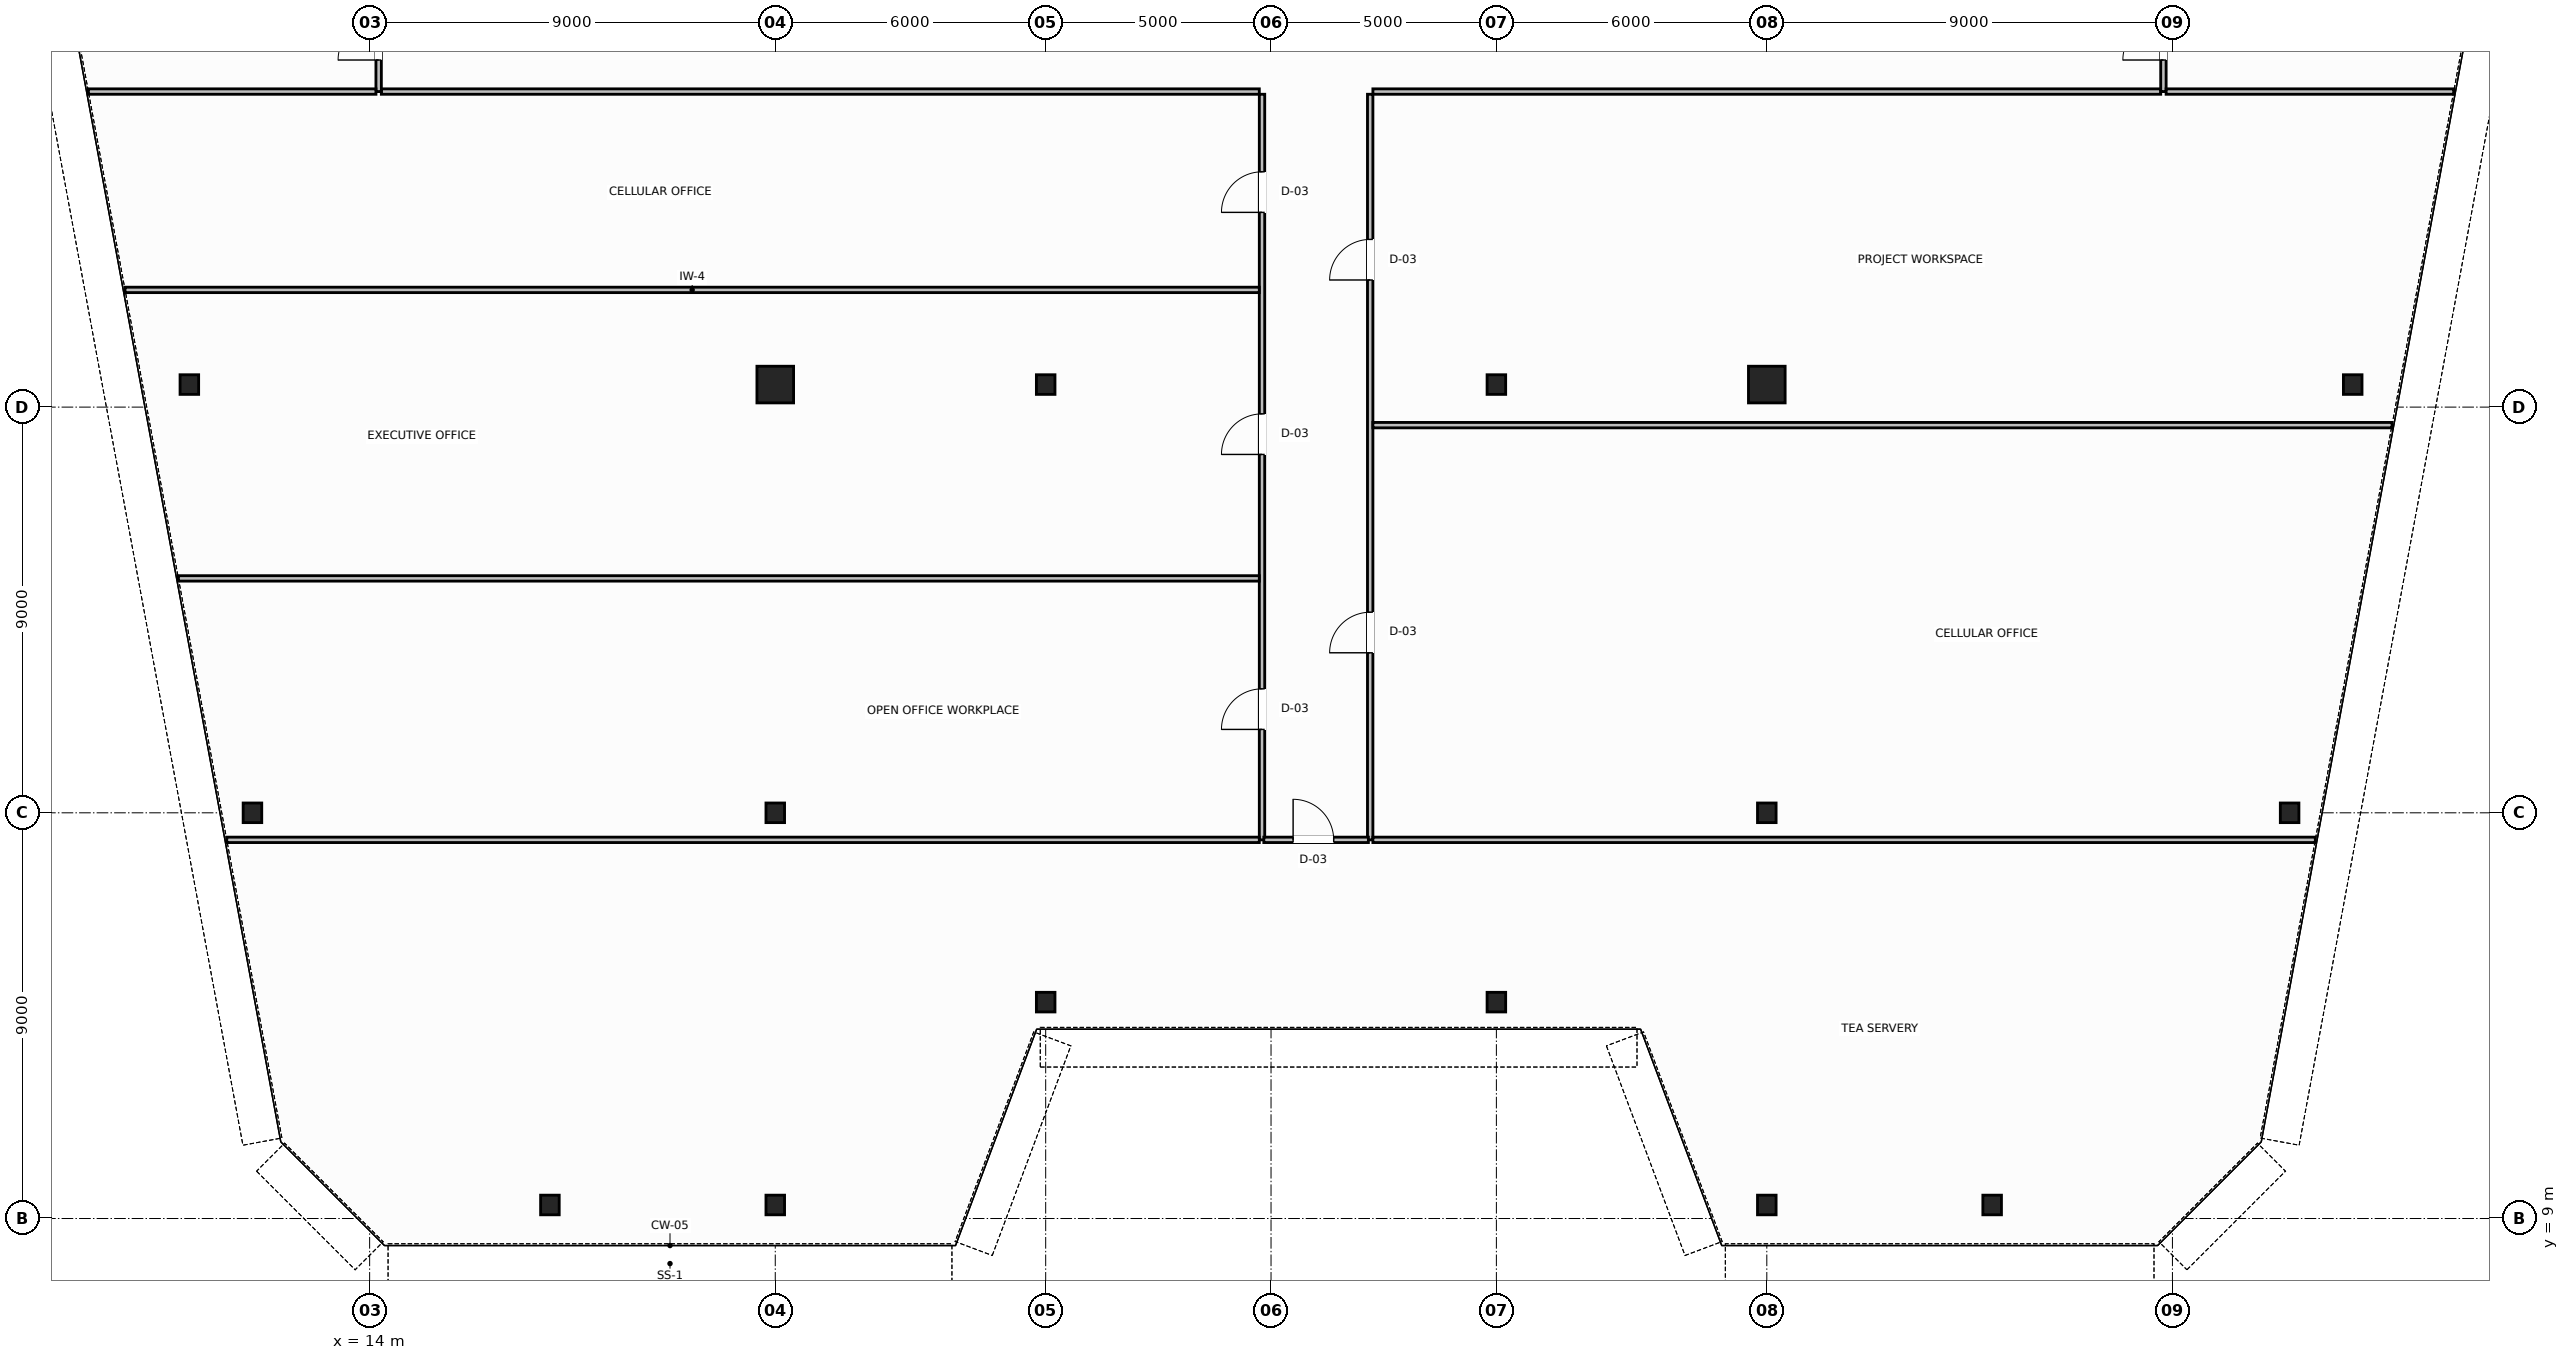
"""IFC4 building model, lengths in metres.
Left out: names, types, materials, properties, quantities, classifications, styles, units other than length and angle.
Written with IfcOpenShell. Run it as: python <this file> out.ifc"""

import sys

from ifc_helpers import new_model, si_unit, direction, frame, frame_2d, origin, origin_2d, place, context, subcontext, project, spatial, rectangle, hollow_circle, i_section, extrude, source, transform, mapped, element, fill, save


model = new_model("IFC4")
c1 = context("Model", 3, precision=1e-05, world=origin(), true_north=direction((0.0, 1.0)))
c2 = subcontext(c1, "Body", "Model", "MODEL_VIEW")
j1 = project(units=[si_unit("LENGTHUNIT", "METRE"), si_unit("PLANEANGLEUNIT", "RADIAN")], contexts=[c1])
p1 = place(None, origin())
s1 = spatial("IfcSite", under=j1, at=p1, CompositionType="ELEMENT")
p2 = place(p1, origin())
s2 = spatial("IfcBuilding", under=s1, at=p2, CompositionType="ELEMENT")
p3 = place(p2, frame((0.0, 0.0, 223.2)))
s3 = spatial("IfcBuildingStorey", under=s2, at=p3, CompositionType="ELEMENT", Elevation=223.2)
m1 = source(origin(), c2, "Body", "SweptSolid", [
    extrude(i_section(OverallWidth=0.412, OverallDepth=0.435, WebThickness=0.036, FlangeThickness=0.05, FilletRadius=0.015, at=origin_2d()), origin(), (0.0, 0.0, 1.0), 3.8),
])
for number, where, z_axis, x_axis in (
    (1, (10.0, 27.5, 0.0), (0.0, 0.0, 1.0), (1.0, 0.0, 0.0)),
    (2, (11.4, 18.0, 0.0), (0.0, 0.0, 1.0), (1.0, 0.0, 0.0)),
    (3, (58.0, 27.5, 0.0), (0.0, 0.0, 1.0), (1.0, 0.0, 0.0)),
    (4, (56.6, 18.0, 0.0), (0.0, 0.0, 1.0), (1.0, 0.0, 0.0)),
):
    element("IfcColumn", number, at=place(p3, frame(where, z_axis=z_axis, x_axis=x_axis)), inside=s3, PredefinedType="COLUMN", context=c2, shape_type="MappedRepresentation", body=[
        mapped(m1, transform((0.0, 0.0, 0.0), scale=1.0)),
    ])
m2 = source(origin(), c2, "Body", "SweptSolid", [
    extrude(hollow_circle(Radius=0.406, WallThickness=0.04, at=origin_2d()), origin(), (0.0, 0.0, 1.0), 3.8),
])
p4 = place(p3, frame((23.0, 27.5, 0.0), z_axis=(0.0, 0.0, 1.0), x_axis=(1.0, 0.0, 0.0)))
e5 = element("IfcColumn", 5, at=p4, inside=s3, PredefinedType="COLUMN", context=c2, shape_type="MappedRepresentation", body=[
    mapped(m2, transform((0.0, 0.0, 0.0), scale=1.0)),
])
m3 = source(origin(), c2, "Body", "SweptSolid", [
    extrude(i_section(OverallWidth=0.412, OverallDepth=0.435, WebThickness=0.036, FlangeThickness=0.05, FilletRadius=0.015, at=origin_2d()), origin(), (0.0, 0.0, 1.0), 3.8),
])
for number, where, z_axis, x_axis in (
    (6, (29.0, 27.5, 0.0), (0.0, 0.0, 1.0), (1.0, 0.0, 0.0)),
    (7, (39.0, 27.5, 0.0), (0.0, 0.0, 1.0), (1.0, 0.0, 0.0)),
):
    element("IfcColumn", number, at=place(p3, frame(where, z_axis=z_axis, x_axis=x_axis)), inside=s3, PredefinedType="COLUMN", context=c2, shape_type="MappedRepresentation", body=[
        mapped(m3, transform((0.0, 0.0, 0.0), scale=1.0)),
    ])
p5 = place(p3, frame((45.0, 27.5, 0.0), z_axis=(0.0, 0.0, 1.0), x_axis=(1.0, 0.0, 0.0)))
e8 = element("IfcColumn", 8, at=p5, inside=s3, PredefinedType="COLUMN", context=c2, shape_type="MappedRepresentation", body=[
    mapped(m2, transform((0.0, 0.0, 0.0), scale=1.0)),
])
for number, where, z_axis, x_axis in (
    (9, (23.0, 18.0, 0.0), (0.0, 0.0, 1.0), (1.0, 0.0, 0.0)),
    (10, (45.0, 18.0, 0.0), (0.0, 0.0, 1.0), (1.0, 0.0, 0.0)),
    (11, (18.0, 9.3, 0.0), (0.0, 0.0, 1.0), (1.0, 0.0, 0.0)),
    (12, (23.0, 9.3, 0.0), (0.0, 0.0, 1.0), (1.0, 0.0, 0.0)),
    (13, (29.0, 13.8, 0.0), (0.0, 0.0, 1.0), (1.0, 0.0, 0.0)),
    (14, (39.0, 13.8, 0.0), (0.0, 0.0, 1.0), (1.0, 0.0, 0.0)),
    (15, (45.0, 9.3, 0.0), (0.0, 0.0, 1.0), (1.0, 0.0, 0.0)),
    (16, (50.0, 9.3, 0.0), (0.0, 0.0, 1.0), (1.0, 0.0, 0.0)),
):
    element("IfcColumn", number, at=place(p3, frame(where, z_axis=z_axis, x_axis=x_axis)), inside=s3, PredefinedType="COLUMN", context=c2, shape_type="MappedRepresentation", body=[
        mapped(m3, transform((0.0, 0.0, 0.0), scale=1.0)),
    ])
p6 = place(p3, frame((14.26, 34.0, 0.0), z_axis=(0.0, 0.0, 1.0), x_axis=(1.0, 0.0, 0.0)))
e17 = element("IfcWall", 17, at=p6, inside=s3, PredefinedType="PARTITIONING", context=c2, shape_type="SweptSolid", body=[
    extrude(rectangle(XDim=19.48, YDim=0.12, at=frame_2d((9.74, 0.0))), origin(), (0.0, 0.0, 1.0), 3.58),
])
p7 = place(p3, frame((36.26, 34.0, 0.0), z_axis=(0.0, 0.0, 1.0), x_axis=(1.0, 0.0, 0.0)))
e18 = element("IfcWall", 18, at=p7, inside=s3, PredefinedType="PARTITIONING", context=c2, shape_type="SweptSolid", body=[
    extrude(rectangle(XDim=17.48, YDim=0.12, at=frame_2d((8.74, 0.0))), origin(), (0.0, 0.0, 1.0), 3.58),
])
p8 = place(p3, frame((14.2, 34.0, 0.0), z_axis=(0.0, 0.0, 1.0), x_axis=(0.0, 1.0, 0.0)))
e19 = element("IfcWall", 19, at=p8, inside=s3, PredefinedType="PARTITIONING", context=c2, shape_type="SweptSolid", body=[
    extrude(rectangle(XDim=2.44, YDim=0.12, at=frame_2d((1.22, 0.0))), origin(), (0.0, 0.0, 1.0), 3.58),
])
p9 = place(p8, frame((0.7, 0.0, 0.0)))
e20 = element("IfcOpeningElement", 20, at=p9, cuts=e19, PredefinedType="OPENING", context=c2, shape_type="SweptSolid", body=[
    extrude(rectangle(XDim=0.9, YDim=2.15, at=frame_2d((0.45, 1.075))), frame((0.0, 0.07, 0.0), z_axis=(0.0, -1.0, 0.0), x_axis=(1.0, 0.0, 0.0)), (0.0, 0.0, 1.0), 0.14),
])
p10 = place(p3, frame((53.8, 34.0, 0.0), z_axis=(0.0, 0.0, 1.0), x_axis=(0.0, 1.0, 0.0)))
e21 = element("IfcWall", 21, at=p10, inside=s3, PredefinedType="PARTITIONING", context=c2, shape_type="SweptSolid", body=[
    extrude(rectangle(XDim=2.44, YDim=0.12, at=frame_2d((1.22, 0.0))), origin(), (0.0, 0.0, 1.0), 3.58),
])
p11 = place(p10, frame((0.7, 0.0, 0.0)))
e22 = element("IfcOpeningElement", 22, at=p11, cuts=e21, PredefinedType="OPENING", context=c2, shape_type="SweptSolid", body=[
    extrude(rectangle(XDim=0.9, YDim=2.15, at=frame_2d((0.45, 1.075))), frame((0.0, 0.07, 0.0), z_axis=(0.0, -1.0, 0.0), x_axis=(1.0, 0.0, 0.0)), (0.0, 0.0, 1.0), 0.14),
])
p12 = place(p3, frame((33.8, 17.4, 0.0), z_axis=(0.0, 0.0, 1.0), x_axis=(0.0, 1.0, 0.0)))
e23 = element("IfcWall", 23, at=p12, inside=s3, PredefinedType="PARTITIONING", context=c2, shape_type="SweptSolid", body=[
    extrude(rectangle(XDim=16.54, YDim=0.12, at=frame_2d((8.27, 0.0))), origin(), (0.0, 0.0, 1.0), 3.58),
])
p13 = place(p12, frame((2.45, 0.0, 0.0)))
e24 = element("IfcOpeningElement", 24, at=p13, cuts=e23, PredefinedType="OPENING", context=c2, shape_type="SweptSolid", body=[
    extrude(rectangle(XDim=0.9, YDim=2.15, at=frame_2d((0.45, 1.075))), frame((0.0, 0.07, 0.0), z_axis=(0.0, -1.0, 0.0), x_axis=(1.0, 0.0, 0.0)), (0.0, 0.0, 1.0), 0.14),
])
p14 = place(p12, frame((8.55, 0.0, 0.0)))
e25 = element("IfcOpeningElement", 25, at=p14, cuts=e23, PredefinedType="OPENING", context=c2, shape_type="SweptSolid", body=[
    extrude(rectangle(XDim=0.9, YDim=2.15, at=frame_2d((0.45, 1.075))), frame((0.0, 0.07, 0.0), z_axis=(0.0, -1.0, 0.0), x_axis=(1.0, 0.0, 0.0)), (0.0, 0.0, 1.0), 0.14),
])
p15 = place(p12, frame((13.92, 0.0, 0.0)))
e26 = element("IfcOpeningElement", 26, at=p15, cuts=e23, PredefinedType="OPENING", context=c2, shape_type="SweptSolid", body=[
    extrude(rectangle(XDim=0.9, YDim=2.15, at=frame_2d((0.45, 1.075))), frame((0.0, 0.07, 0.0), z_axis=(0.0, -1.0, 0.0), x_axis=(1.0, 0.0, 0.0)), (0.0, 0.0, 1.0), 0.14),
])
p16 = place(p3, frame((36.2, 17.4, 0.0), z_axis=(0.0, 0.0, 1.0), x_axis=(0.0, 1.0, 0.0)))
e27 = element("IfcWall", 27, at=p16, inside=s3, PredefinedType="PARTITIONING", context=c2, shape_type="SweptSolid", body=[
    extrude(rectangle(XDim=16.54, YDim=0.12, at=frame_2d((8.27, 0.0))), origin(), (0.0, 0.0, 1.0), 3.58),
])
p17 = place(p16, frame((4.15, 0.0, 0.0)))
e28 = element("IfcOpeningElement", 28, at=p17, cuts=e27, PredefinedType="OPENING", context=c2, shape_type="SweptSolid", body=[
    extrude(rectangle(XDim=0.9, YDim=2.15, at=frame_2d((0.45, 1.075))), frame((0.0, 0.07, 0.0), z_axis=(0.0, -1.0, 0.0), x_axis=(1.0, 0.0, 0.0)), (0.0, 0.0, 1.0), 0.14),
])
p18 = place(p16, frame((12.42, 0.0, 0.0)))
e29 = element("IfcOpeningElement", 29, at=p18, cuts=e27, PredefinedType="OPENING", context=c2, shape_type="SweptSolid", body=[
    extrude(rectangle(XDim=0.9, YDim=2.15, at=frame_2d((0.45, 1.075))), frame((0.0, 0.07, 0.0), z_axis=(0.0, -1.0, 0.0), x_axis=(1.0, 0.0, 0.0)), (0.0, 0.0, 1.0), 0.14),
])
p19 = place(p3, frame((33.84, 17.4, 0.0), z_axis=(0.0, 0.0, 1.0), x_axis=(1.0, 0.0, 0.0)))
e30 = element("IfcWall", 30, at=p19, inside=s3, PredefinedType="PARTITIONING", context=c2, shape_type="SweptSolid", body=[
    extrude(rectangle(XDim=2.32, YDim=0.12, at=frame_2d((1.16, 0.0))), origin(), (0.0, 0.0, 1.0), 3.58),
])
p20 = place(p19, frame((0.65, 0.0, 0.0)))
e31 = element("IfcOpeningElement", 31, at=p20, cuts=e30, PredefinedType="OPENING", context=c2, shape_type="SweptSolid", body=[
    extrude(rectangle(XDim=0.9, YDim=2.15, at=frame_2d((0.45, 1.075))), frame((0.0, 0.07, 0.0), z_axis=(0.0, -1.0, 0.0), x_axis=(1.0, 0.0, 0.0)), (0.0, 0.0, 1.0), 0.14),
])
for number, where, z_axis, x_axis in (
    (32, (7.759, 34.0, 0.0), (0.0, 0.0, 1.0), (1.0, 0.0, 0.0)),
    (33, (53.86, 34.0, 0.0), (0.0, 0.0, 1.0), (1.0, 0.0, 0.0)),
):
    element("IfcWall", number, at=place(p3, frame(where, z_axis=z_axis, x_axis=x_axis)), inside=s3, PredefinedType="PARTITIONING", context=c2, shape_type="SweptSolid", body=[
        extrude(rectangle(XDim=6.381, YDim=0.12, at=frame_2d((3.19, 0.0))), origin(), (0.0, 0.0, 1.0), 3.58),
    ])
p21 = place(p3, frame((9.757, 23.2, 0.0), z_axis=(0.0, 0.0, 1.0), x_axis=(1.0, 0.0, 0.0)))
e34 = element("IfcWall", 34, at=p21, inside=s3, PredefinedType="PARTITIONING", context=c2, shape_type="SweptSolid", body=[
    extrude(rectangle(XDim=23.983, YDim=0.12, at=frame_2d((11.992, 0.0))), origin(), (0.0, 0.0, 1.0), 3.58),
])
p22 = place(p3, frame((8.573, 29.6, 0.0), z_axis=(0.0, 0.0, 1.0), x_axis=(1.0, 0.0, 0.0)))
e35 = element("IfcWall", 35, at=p22, inside=s3, PredefinedType="PARTITIONING", context=c2, shape_type="SweptSolid", body=[
    extrude(rectangle(XDim=25.167, YDim=0.12, at=frame_2d((12.583, 0.0))), origin(), (0.0, 0.0, 1.0), 3.58),
])
p23 = place(p3, frame((36.26, 26.6, 0.0), z_axis=(0.0, 0.0, 1.0), x_axis=(1.0, 0.0, 0.0)))
e36 = element("IfcWall", 36, at=p23, inside=s3, PredefinedType="PARTITIONING", context=c2, shape_type="SweptSolid", body=[
    extrude(rectangle(XDim=22.612, YDim=0.12, at=frame_2d((11.306, 0.0))), origin(), (0.0, 0.0, 1.0), 3.58),
])
p24 = place(p3, frame((10.83, 17.4, 0.0), z_axis=(0.0, 0.0, 1.0), x_axis=(1.0, 0.0, 0.0)))
e37 = element("IfcWall", 37, at=p24, inside=s3, PredefinedType="PARTITIONING", context=c2, shape_type="SweptSolid", body=[
    extrude(rectangle(XDim=22.91, YDim=0.12, at=frame_2d((11.455, 0.0))), origin(), (0.0, 0.0, 1.0), 3.58),
])
p25 = place(p3, frame((36.26, 17.4, 0.0), z_axis=(0.0, 0.0, 1.0), x_axis=(1.0, 0.0, 0.0)))
e38 = element("IfcWall", 38, at=p25, inside=s3, PredefinedType="PARTITIONING", context=c2, shape_type="SweptSolid", body=[
    extrude(rectangle(XDim=20.91, YDim=0.12, at=frame_2d((10.455, 0.0))), origin(), (0.0, 0.0, 1.0), 3.58),
])
m4 = source(origin(), c2, "Body", "SweptSolid", [
    extrude(rectangle(XDim=0.9, YDim=2.15, at=frame_2d((0.45, 1.075))), frame((0.0, 0.025, 0.0), z_axis=(0.0, -1.0, 0.0), x_axis=(1.0, 0.0, 0.0)), (0.0, 0.0, 1.0), 0.05),
])
p26 = place(p9, origin())
e39 = element("IfcDoor", 39, at=p26, inside=s3, OperationType="SINGLE_SWING_LEFT", PredefinedType="DOOR", context=c2, shape_type="MappedRepresentation", body=[
    mapped(m4, transform((0.0, 0.0, 0.0), scale=1.0)),
])
fill(e20, e39)
p27 = place(p11, origin())
e40 = element("IfcDoor", 40, at=p27, inside=s3, OperationType="SINGLE_SWING_RIGHT", PredefinedType="DOOR", context=c2, shape_type="MappedRepresentation", body=[
    mapped(m4, transform((0.0, 0.0, 0.0), scale=1.0)),
])
fill(e22, e40)
p28 = place(p13, origin())
e41 = element("IfcDoor", 41, at=p28, inside=s3, OperationType="SINGLE_SWING_LEFT", PredefinedType="DOOR", context=c2, shape_type="MappedRepresentation", body=[
    mapped(m4, transform((0.0, 0.0, 0.0), scale=1.0)),
])
fill(e24, e41)
p29 = place(p14, origin())
e42 = element("IfcDoor", 42, at=p29, inside=s3, OperationType="SINGLE_SWING_RIGHT", PredefinedType="DOOR", context=c2, shape_type="MappedRepresentation", body=[
    mapped(m4, transform((0.0, 0.0, 0.0), scale=1.0)),
])
fill(e25, e42)
p30 = place(p15, origin())
e43 = element("IfcDoor", 43, at=p30, inside=s3, OperationType="SINGLE_SWING_LEFT", PredefinedType="DOOR", context=c2, shape_type="MappedRepresentation", body=[
    mapped(m4, transform((0.0, 0.0, 0.0), scale=1.0)),
])
fill(e26, e43)
p31 = place(p17, origin())
e44 = element("IfcDoor", 44, at=p31, inside=s3, OperationType="SINGLE_SWING_RIGHT", PredefinedType="DOOR", context=c2, shape_type="MappedRepresentation", body=[
    mapped(m4, transform((0.0, 0.0, 0.0), scale=1.0)),
])
fill(e28, e44)
p32 = place(p18, origin())
e45 = element("IfcDoor", 45, at=p32, inside=s3, OperationType="SINGLE_SWING_LEFT", PredefinedType="DOOR", context=c2, shape_type="MappedRepresentation", body=[
    mapped(m4, transform((0.0, 0.0, 0.0), scale=1.0)),
])
fill(e29, e45)
p33 = place(p20, origin())
e46 = element("IfcDoor", 46, at=p33, inside=s3, OperationType="SINGLE_SWING_LEFT", PredefinedType="DOOR", context=c2, shape_type="MappedRepresentation", body=[
    mapped(m4, transform((0.0, 0.0, 0.0), scale=1.0)),
])
fill(e31, e46)
save(model, sys.argv[1])
